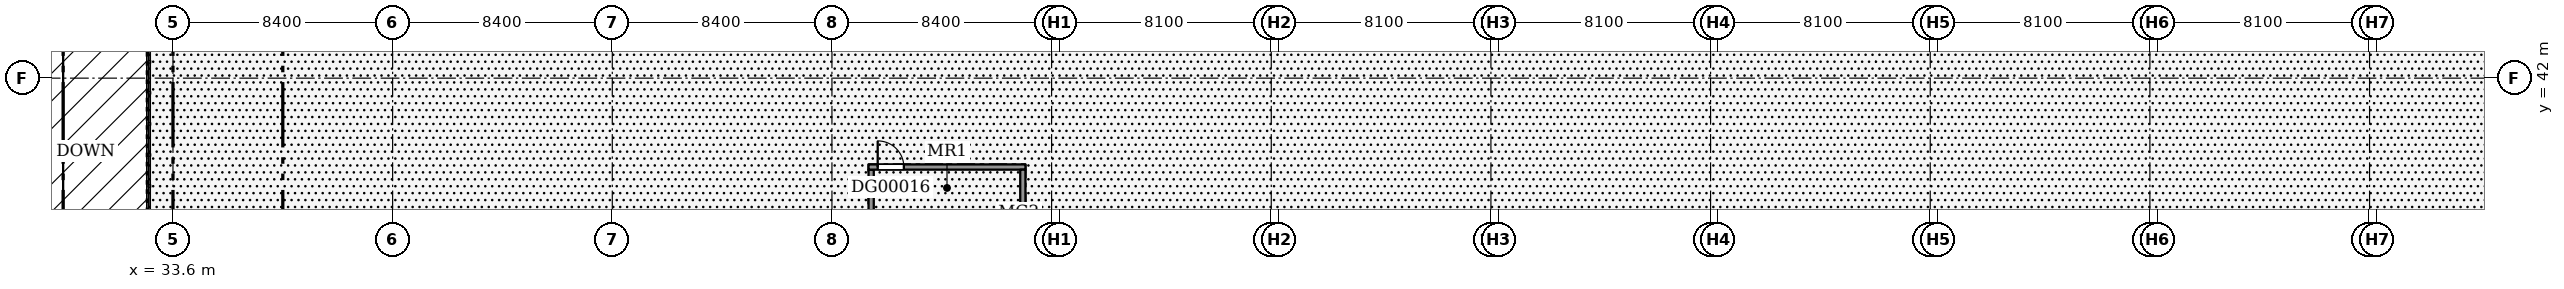
"""IFC4 building model, lengths in metres.
Left out: names, types, materials, properties, quantities, classifications, styles, units other than length and angle.
Written with IfcOpenShell. Run it as: python <this file> out.ifc"""

import sys

from ifc_helpers import new_model, si_unit, direction, frame, frame_2d, origin, place, context, subcontext, project, spatial, rectangle, extrude, element, fill, save


model = new_model("IFC4")
c1 = context("Model", 3, precision=1e-05, world=origin(), true_north=direction((0.0, 1.0)))
c2 = subcontext(c1, "Body", "Model", "MODEL_VIEW")
j1 = project(units=[si_unit("LENGTHUNIT", "METRE"), si_unit("PLANEANGLEUNIT", "RADIAN")], contexts=[c1])
p1 = place(None, origin())
s1 = spatial("IfcSite", under=j1, at=p1, CompositionType="ELEMENT")
p2 = place(p1, origin())
s2 = spatial("IfcBuilding", under=s1, at=p2, CompositionType="ELEMENT")
p3 = place(p2, origin())
s3 = spatial("IfcBuildingStorey", under=s2, at=p3, CompositionType="ELEMENT", Elevation=0.0)
p4 = place(p3, frame((60.3, 33.7, 0.0), z_axis=(0.0, 0.0, 1.0), x_axis=(0.0, 1.0, 0.0)))
e1 = element("IfcWall", 1, at=p4, inside=s3, PredefinedType="SOLIDWALL", context=c2, shape_type="SweptSolid", body=[
    extrude(rectangle(XDim=4.8, YDim=0.2, at=frame_2d((2.4, 0.0))), origin(), (0.0, 0.0, 1.0), 3.6),
])
p5 = place(p3, frame((60.2, 38.6, 0.0), z_axis=(0.0, 0.0, 1.0), x_axis=(1.0, 0.0, 0.0)))
e2 = element("IfcWall", 2, at=p5, inside=s3, PredefinedType="SOLIDWALL", context=c2, shape_type="SweptSolid", body=[
    extrude(rectangle(XDim=6.0, YDim=0.2, at=frame_2d((3.0, 0.0))), origin(), (0.0, 0.0, 1.0), 3.6),
])
p6 = place(p5, frame((0.35, 0.0, 0.0)))
e3 = element("IfcOpeningElement", 3, at=p6, cuts=e2, PredefinedType="OPENING", context=c2, shape_type="SweptSolid", body=[
    extrude(rectangle(XDim=1.0, YDim=2.1, at=frame_2d((0.5, 1.05))), frame((0.0, 0.11, 0.0), z_axis=(0.0, -1.0, 0.0), x_axis=(1.0, 0.0, 0.0)), (0.0, 0.0, 1.0), 0.22),
])
p7 = place(p3, frame((66.1, 33.7, 0.0), z_axis=(0.0, 0.0, 1.0), x_axis=(0.0, 1.0, 0.0)))
e4 = element("IfcWall", 4, at=p7, inside=s3, PredefinedType="SOLIDWALL", context=c2, shape_type="SweptSolid", body=[
    extrude(rectangle(XDim=4.8, YDim=0.2, at=frame_2d((2.4, 0.0))), origin(), (0.0, 0.0, 1.0), 3.6),
])
p8 = place(p6, origin())
e5 = element("IfcDoor", 5, at=p8, inside=s3, OperationType="SINGLE_SWING_LEFT", PredefinedType="DOOR", context=c2, shape_type="SweptSolid", body=[
    extrude(rectangle(XDim=1.0, YDim=2.1, at=frame_2d((0.5, 1.05))), frame((0.0, 0.025, 0.0), z_axis=(0.0, -1.0, 0.0), x_axis=(1.0, 0.0, 0.0)), (0.0, 0.0, 1.0), 0.05),
])
fill(e3, e5)
save(model, sys.argv[1])
